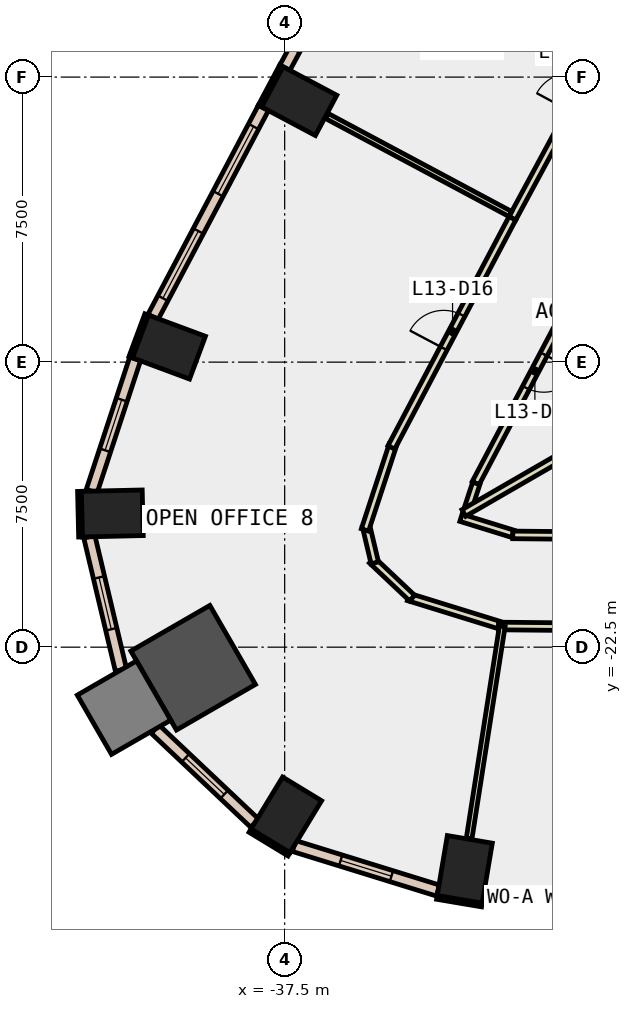
"""IFC4 building model, lengths in metres.
Left out: names, types, materials, properties, quantities, classifications, styles, units other than length and angle.
Written with IfcOpenShell. Run it as: python <this file> out.ifc"""

import sys

from ifc_helpers import new_model, si_unit, direction, frame, frame_2d, origin, origin_2d, place, context, subcontext, project, spatial, rectangle, extrude, element, fill, save


model = new_model("IFC4")
c1 = context("Model", 3, precision=1e-05, world=origin(), true_north=direction((0.0, 1.0)))
c2 = subcontext(c1, "Body", "Model", "MODEL_VIEW")
j1 = project(units=[si_unit("LENGTHUNIT", "METRE"), si_unit("PLANEANGLEUNIT", "RADIAN")], contexts=[c1])
p1 = place(None, origin())
s1 = spatial("IfcSite", under=j1, at=p1, CompositionType="ELEMENT")
p2 = place(p1, origin())
s2 = spatial("IfcBuilding", under=s1, at=p2, CompositionType="ELEMENT")
p3 = place(p2, frame((0.0, 0.0, 64.4)))
s3 = spatial("IfcBuildingStorey", under=s2, at=p3, CompositionType="ELEMENT", Elevation=64.4)
for number, where, z_axis, x_axis in (
    (1, (-32.761, -28.346, -0.4), (0.0, 0.0, 1.0), (-0.986, 0.167, 0.0)),
    (2, (-37.117, -8.132, -0.4), (0.0, 0.0, 1.0), (0.469, 0.883, 0.0)),
    (3, (-40.544, -14.604, -0.4), (0.0, 0.0, 1.0), (0.348, 0.937, 0.0)),
    (4, (-42.035, -18.982, -0.4), (0.0, 0.0, 1.0), (-0.023, 1.0, 0.0)),
):
    element("IfcColumn", number, at=place(p3, frame(where, z_axis=z_axis, x_axis=x_axis)), inside=s3, PredefinedType="COLUMN", context=c2, shape_type="SweptSolid", body=[
        extrude(rectangle(XDim=1.2, YDim=1.6, at=origin_2d()), origin(), (0.0, 0.0, 1.0), 4.2),
    ])
p4 = place(p3, frame((-39.908, -23.041, -0.4), z_axis=(0.0, 0.0, 1.0), x_axis=(0.866025403784, 0.5, 0.0)))
e5 = element("IfcColumn", 5, at=p4, inside=s3, PredefinedType="COLUMN", context=c2, shape_type="SweptSolid", body=[
    extrude(rectangle(XDim=2.4, YDim=2.4, at=origin_2d()), origin(), (0.0, 0.0, 1.0), 4.2),
])
p5 = place(p3, frame((-37.457, -26.913, -0.4), z_axis=(0.0, 0.0, 1.0), x_axis=(-0.854522294989, 0.519414716163, 0.0)))
e6 = element("IfcColumn", 6, at=p5, inside=s3, PredefinedType="COLUMN", context=c2, shape_type="SweptSolid", body=[
    extrude(rectangle(XDim=1.2, YDim=1.6, at=origin_2d()), origin(), (0.0, 0.0, 1.0), 4.2),
])
p6 = place(p3, frame((-41.727, -24.091, -0.4), z_axis=(0.0, 0.0, 1.0), x_axis=(0.866025403784, 0.5, 0.0)))
e7 = element("IfcColumn", 7, at=p6, inside=s3, PredefinedType="COLUMN", context=c2, shape_type="SweptSolid", body=[
    extrude(rectangle(XDim=1.8, YDim=1.8, at=origin_2d()), origin(), (0.0, 0.0, 1.0), 4.2),
])
p7 = place(p3, frame((-37.586, -7.204, 0.0), z_axis=(0.0, 0.0, 1.0), x_axis=(-0.469467784567, -0.882949601763, 0.0)))
e8 = element("IfcWall", 8, at=p7, inside=s3, PredefinedType="STANDARD", context=c2, shape_type="SweptSolid", body=[
    extrude(rectangle(XDim=1.199, YDim=0.1, at=frame_2d((0.6, 0.0))), origin(), (0.0, 0.0, 1.0), 3.8),
])
p8 = place(p3, frame((-41.132, -13.746, 0.0), z_axis=(0.0, 0.0, 1.0), x_axis=(-0.348268249601, -0.937394914814, 0.0)))
e9 = element("IfcWall", 9, at=p8, inside=s3, PredefinedType="STANDARD", context=c2, shape_type="SweptSolid", body=[
    extrude(rectangle(XDim=1.2, YDim=0.1, at=frame_2d((0.6, 0.0))), origin(), (0.0, 0.0, 1.0), 3.8),
])
p9 = place(p3, frame((-33.494, -29.084, 0.0), z_axis=(0.0, 0.0, 1.0), x_axis=(0.986011774526, -0.166675674579, 0.0)))
e10 = element("IfcWall", 10, at=p9, inside=s3, PredefinedType="STANDARD", context=c2, shape_type="SweptSolid", body=[
    extrude(rectangle(XDim=1.2, YDim=0.1, at=frame_2d((0.6, 0.0))), origin(), (0.0, 0.0, 1.0), 3.8),
])
p10 = place(p3, frame((-42.899, -18.401, 0.0), z_axis=(0.0, 0.0, 1.0), x_axis=(0.023183352363, -0.999731229968, 0.0)))
e11 = element("IfcWall", 11, at=p10, inside=s3, PredefinedType="STANDARD", context=c2, shape_type="SweptSolid", body=[
    extrude(rectangle(XDim=1.2, YDim=0.1, at=frame_2d((0.6, 0.0))), origin(), (0.0, 0.0, 1.0), 3.8),
])
p11 = place(p3, frame((-38.411, -27.328, 0.0), z_axis=(0.0, 0.0, 1.0), x_axis=(0.854716608594, -0.519094903649, 0.0)))
e12 = element("IfcWall", 12, at=p11, inside=s3, PredefinedType="STANDARD", context=c2, shape_type="SweptSolid", body=[
    extrude(rectangle(XDim=1.2, YDim=0.1, at=frame_2d((0.6, 0.0))), origin(), (0.0, 0.0, 1.0), 3.8),
])
p12 = place(p3, frame((-32.279, -29.089, 0.0), z_axis=(0.0, 0.0, 1.0), x_axis=(0.999952253205, -0.009771965572, 0.0)))
e13 = element("IfcWall", 13, at=p12, inside=s3, PredefinedType="STANDARD", context=c2, shape_type="SweptSolid", body=[
    extrude(rectangle(XDim=7.145, YDim=0.3, at=frame_2d((3.573, 0.0))), origin(), (0.0, 0.0, 1.0), 3.8),
])
p13 = place(p12, frame((0.586, 0.0, 0.9)))
e14 = element("IfcOpeningElement", 14, at=p13, cuts=e13, PredefinedType="OPENING", context=c2, shape_type="SweptSolid", body=[
    extrude(rectangle(XDim=2.4, YDim=2.6, at=frame_2d((1.2, 1.3))), frame((0.0, 0.16, 0.0), z_axis=(0.0, -1.0, 0.0), x_axis=(1.0, 0.0, 0.0)), (0.0, 0.0, 1.0), 0.32),
])
p14 = place(p12, frame((4.159, 0.0, 0.9)))
e15 = element("IfcOpeningElement", 15, at=p14, cuts=e13, PredefinedType="OPENING", context=c2, shape_type="SweptSolid", body=[
    extrude(rectangle(XDim=2.4, YDim=2.6, at=frame_2d((1.2, 1.3))), frame((0.0, 0.16, 0.0), z_axis=(0.0, -1.0, 0.0), x_axis=(1.0, 0.0, 0.0)), (0.0, 0.0, 1.0), 0.32),
])
p15 = place(p3, frame((-34.583, -1.864, 0.0), z_axis=(0.0, 0.0, 1.0), x_axis=(-0.475413659872, -0.879762383833, 0.0)))
e16 = element("IfcWall", 16, at=p15, inside=s3, PredefinedType="STANDARD", context=c2, shape_type="SweptSolid", body=[
    extrude(rectangle(XDim=6.125, YDim=0.3, at=frame_2d((3.063, 0.0))), origin(), (0.0, 0.0, 1.0), 3.8),
])
p16 = place(p15, frame((0.531, 0.0, 0.9)))
e17 = element("IfcOpeningElement", 17, at=p16, cuts=e16, PredefinedType="OPENING", context=c2, shape_type="SweptSolid", body=[
    extrude(rectangle(XDim=2.0, YDim=2.6, at=frame_2d((1.0, 1.3))), frame((0.0, 0.16, 0.0), z_axis=(0.0, -1.0, 0.0), x_axis=(1.0, 0.0, 0.0)), (0.0, 0.0, 1.0), 0.32),
])
p17 = place(p15, frame((3.594, 0.0, 0.9)))
e18 = element("IfcOpeningElement", 18, at=p17, cuts=e16, PredefinedType="OPENING", context=c2, shape_type="SweptSolid", body=[
    extrude(rectangle(XDim=2.0, YDim=2.6, at=frame_2d((1.0, 1.3))), frame((0.0, 0.16, 0.0), z_axis=(0.0, -1.0, 0.0), x_axis=(1.0, 0.0, 0.0)), (0.0, 0.0, 1.0), 0.32),
])
p18 = place(p3, frame((-38.059, -8.31, 0.0), z_axis=(0.0, 0.0, 1.0), x_axis=(-0.467041710902, -0.884235285587, 0.0)))
e19 = element("IfcWall", 19, at=p18, inside=s3, PredefinedType="STANDARD", context=c2, shape_type="SweptSolid", body=[
    extrude(rectangle(XDim=6.22, YDim=0.3, at=frame_2d((3.11, 0.0))), origin(), (0.0, 0.0, 1.0), 3.8),
])
p19 = place(p18, frame((0.555, 0.0, 0.9)))
e20 = element("IfcOpeningElement", 20, at=p19, cuts=e19, PredefinedType="OPENING", context=c2, shape_type="SweptSolid", body=[
    extrude(rectangle(XDim=2.0, YDim=2.6, at=frame_2d((1.0, 1.3))), frame((0.0, 0.16, 0.0), z_axis=(0.0, -1.0, 0.0), x_axis=(1.0, 0.0, 0.0)), (0.0, 0.0, 1.0), 0.32),
])
p20 = place(p18, frame((3.665, 0.0, 0.9)))
e21 = element("IfcOpeningElement", 21, at=p20, cuts=e19, PredefinedType="OPENING", context=c2, shape_type="SweptSolid", body=[
    extrude(rectangle(XDim=2.0, YDim=2.6, at=frame_2d((1.0, 1.3))), frame((0.0, 0.16, 0.0), z_axis=(0.0, -1.0, 0.0), x_axis=(1.0, 0.0, 0.0)), (0.0, 0.0, 1.0), 0.32),
])
p21 = place(p3, frame((-41.434, -14.913, 0.0), z_axis=(0.0, 0.0, 1.0), x_axis=(-0.31208801137, -0.95005319491, 0.0)))
e22 = element("IfcWall", 22, at=p21, inside=s3, PredefinedType="STANDARD", context=c2, shape_type="SweptSolid", body=[
    extrude(rectangle(XDim=3.665, YDim=0.3, at=frame_2d((1.833, 0.0))), origin(), (0.0, 0.0, 1.0), 3.8),
])
p22 = place(p21, frame((1.133, 0.0, 0.9)))
e23 = element("IfcOpeningElement", 23, at=p22, cuts=e22, PredefinedType="OPENING", context=c2, shape_type="SweptSolid", body=[
    extrude(rectangle(XDim=1.4, YDim=2.6, at=frame_2d((0.7, 1.3))), frame((0.0, 0.16, 0.0), z_axis=(0.0, -1.0, 0.0), x_axis=(1.0, 0.0, 0.0)), (0.0, 0.0, 1.0), 0.32),
])
p23 = place(p3, frame((-42.64, -19.595, 0.0), z_axis=(0.0, 0.0, 1.0), x_axis=(0.230893603767, -0.972979004778, 0.0)))
e24 = element("IfcWall", 24, at=p23, inside=s3, PredefinedType="STANDARD", context=c2, shape_type="SweptSolid", body=[
    extrude(rectangle(XDim=3.603, YDim=0.3, at=frame_2d((1.801, 0.0))), origin(), (0.0, 0.0, 1.0), 3.8),
])
p24 = place(p23, frame((1.101, 0.0, 0.9)))
e25 = element("IfcOpeningElement", 25, at=p24, cuts=e24, PredefinedType="OPENING", context=c2, shape_type="SweptSolid", body=[
    extrude(rectangle(XDim=1.4, YDim=2.6, at=frame_2d((0.7, 1.3))), frame((0.0, 0.16, 0.0), z_axis=(0.0, -1.0, 0.0), x_axis=(1.0, 0.0, 0.0)), (0.0, 0.0, 1.0), 0.32),
])
p25 = place(p3, frame((-40.909, -24.657, 0.0), z_axis=(0.0, 0.0, 1.0), x_axis=(0.727082698591, -0.686549888508, 0.0)))
e26 = element("IfcWall", 26, at=p25, inside=s3, PredefinedType="STANDARD", context=c2, shape_type="SweptSolid", body=[
    extrude(rectangle(XDim=3.602, YDim=0.3, at=frame_2d((1.801, 0.0))), origin(), (0.0, 0.0, 1.0), 3.8),
])
p26 = place(p25, frame((1.101, 0.0, 0.9)))
e27 = element("IfcOpeningElement", 27, at=p26, cuts=e26, PredefinedType="OPENING", context=c2, shape_type="SweptSolid", body=[
    extrude(rectangle(XDim=1.4, YDim=2.6, at=frame_2d((0.7, 1.3))), frame((0.0, 0.16, 0.0), z_axis=(0.0, -1.0, 0.0), x_axis=(1.0, 0.0, 0.0)), (0.0, 0.0, 1.0), 0.32),
])
p27 = place(p3, frame((-37.254, -27.732, 0.0), z_axis=(0.0, 0.0, 1.0), x_axis=(0.955308230541, -0.295611543518, 0.0)))
e28 = element("IfcWall", 28, at=p27, inside=s3, PredefinedType="STANDARD", context=c2, shape_type="SweptSolid", body=[
    extrude(rectangle(XDim=3.968, YDim=0.3, at=frame_2d((1.984, 0.0))), origin(), (0.0, 0.0, 1.0), 3.8),
])
p28 = place(p27, frame((1.284, 0.0, 0.9)))
e29 = element("IfcOpeningElement", 29, at=p28, cuts=e28, PredefinedType="OPENING", context=c2, shape_type="SweptSolid", body=[
    extrude(rectangle(XDim=1.4, YDim=2.6, at=frame_2d((0.7, 1.3))), frame((0.0, 0.16, 0.0), z_axis=(0.0, -1.0, 0.0), x_axis=(1.0, 0.0, 0.0)), (0.0, 0.0, 1.0), 0.32),
])
p29 = place(p3, frame((-29.356, -12.281, 0.0), z_axis=(0.0, 0.0, 1.0), x_axis=(-0.467123190417, -0.884192244353, 0.0)))
e30 = element("IfcWall", 30, at=p29, inside=s3, PredefinedType="PARTITIONING", context=c2, shape_type="SweptSolid", body=[
    extrude(rectangle(XDim=6.677, YDim=0.2, at=frame_2d((3.339, 0.0))), origin(), (0.0, 0.0, 1.0), 3.8),
])
p30 = place(p29, frame((2.839, 0.0, 0.0)))
e31 = element("IfcOpeningElement", 31, at=p30, cuts=e30, PredefinedType="OPENING", context=c2, shape_type="SweptSolid", body=[
    extrude(rectangle(XDim=1.0, YDim=2.1, at=frame_2d((0.5, 1.05))), frame((0.0, 0.11, 0.0), z_axis=(0.0, -1.0, 0.0), x_axis=(1.0, 0.0, 0.0)), (0.0, 0.0, 1.0), 0.22),
])
p31 = place(p3, frame((-32.459, -18.191, 0.0), z_axis=(0.0, 0.0, 1.0), x_axis=(-0.312158013001, -0.950030196846, 0.0)))
e32 = element("IfcWall", 32, at=p31, inside=s3, PredefinedType="PARTITIONING", context=c2, shape_type="SweptSolid", body=[
    extrude(rectangle(XDim=0.666, YDim=0.2, at=frame_2d((0.333, 0.0))), origin(), (0.0, 0.0, 1.0), 3.8),
])
p32 = place(p3, frame((-32.861, -19.095, 0.0), z_axis=(0.0, 0.0, 1.0), x_axis=(0.955301951006, -0.29563183591, 0.0)))
e33 = element("IfcWall", 33, at=p32, inside=s3, PredefinedType="PARTITIONING", context=c2, shape_type="SweptSolid", body=[
    extrude(rectangle(XDim=1.431, YDim=0.2, at=frame_2d((0.716, 0.0))), origin(), (0.0, 0.0, 1.0), 3.8),
])
p33 = place(p3, frame((-31.498, -19.546, 0.0), z_axis=(0.0, 0.0, 1.0), x_axis=(0.999950985372, -0.009900851195, 0.0)))
e34 = element("IfcWall", 34, at=p33, inside=s3, PredefinedType="PARTITIONING", context=c2, shape_type="SweptSolid", body=[
    extrude(rectangle(XDim=6.978, YDim=0.2, at=frame_2d((3.489, 0.0))), origin(), (0.0, 0.0, 1.0), 3.8),
])
p34 = place(p3, frame((-31.509, -11.216, 0.0), z_axis=(0.0, 0.0, 1.0), x_axis=(0.475367159168, 0.879787510701, 0.0)))
e35 = element("IfcWall", 35, at=p34, inside=s3, PredefinedType="PARTITIONING", context=c2, shape_type="SweptSolid", body=[
    extrude(rectangle(XDim=7.257, YDim=0.2, at=frame_2d((3.629, 0.0))), origin(), (0.0, 0.0, 1.0), 3.8),
])
p35 = place(p34, frame((3.203, 0.0, 0.0)))
e36 = element("IfcOpeningElement", 36, at=p35, cuts=e35, PredefinedType="OPENING", context=c2, shape_type="SweptSolid", body=[
    extrude(rectangle(XDim=1.0, YDim=2.1, at=frame_2d((0.5, 1.05))), frame((0.0, 0.11, 0.0), z_axis=(0.0, -1.0, 0.0), x_axis=(1.0, 0.0, 0.0)), (0.0, 0.0, 1.0), 0.22),
])
p36 = place(p3, frame((-31.868, -21.914, 0.0), z_axis=(0.0, 0.0, 1.0), x_axis=(-0.955329505989, 0.295542780299, 0.0)))
e37 = element("IfcWall", 37, at=p36, inside=s3, PredefinedType="PARTITIONING", context=c2, shape_type="SweptSolid", body=[
    extrude(rectangle(XDim=2.484, YDim=0.2, at=frame_2d((1.242, 0.0))), origin(), (0.0, 0.0, 1.0), 3.8),
])
p37 = place(p3, frame((-34.146, -21.209, 0.0), z_axis=(0.0, 0.0, 1.0), x_axis=(-0.727092478665, 0.686539530885, 0.0)))
e38 = element("IfcWall", 38, at=p37, inside=s3, PredefinedType="PARTITIONING", context=c2, shape_type="SweptSolid", body=[
    extrude(rectangle(XDim=1.451, YDim=0.2, at=frame_2d((0.726, 0.0))), origin(), (0.0, 0.0, 1.0), 3.8),
])
p38 = place(p3, frame((-35.129, -20.281, 0.0), z_axis=(0.0, 0.0, 1.0), x_axis=(-0.230392306785, 0.973097829087, 0.0)))
e39 = element("IfcWall", 39, at=p38, inside=s3, PredefinedType="PARTITIONING", context=c2, shape_type="SweptSolid", body=[
    extrude(rectangle(XDim=0.986, YDim=0.2, at=frame_2d((0.493, 0.0))), origin(), (0.0, 0.0, 1.0), 3.8),
])
p39 = place(p3, frame((-35.387, -19.416, 0.0), z_axis=(0.0, 0.0, 1.0), x_axis=(0.31172635658, 0.950171920556, 0.0)))
e40 = element("IfcWall", 40, at=p39, inside=s3, PredefinedType="PARTITIONING", context=c2, shape_type="SweptSolid", body=[
    extrude(rectangle(XDim=2.345, YDim=0.2, at=frame_2d((1.172, 0.0))), origin(), (0.0, 0.0, 1.0), 3.8),
])
p40 = place(p3, frame((-34.692, -17.243, 0.0), z_axis=(0.0, 0.0, 1.0), x_axis=(0.467102540817, 0.884203153332, 0.0)))
e41 = element("IfcWall", 41, at=p40, inside=s3, PredefinedType="PARTITIONING", context=c2, shape_type="SweptSolid", body=[
    extrude(rectangle(XDim=6.816, YDim=0.2, at=frame_2d((3.408, 0.0))), origin(), (0.0, 0.0, 1.0), 3.8),
])
p41 = place(p40, frame((2.946, 0.0, 0.0)))
e42 = element("IfcOpeningElement", 42, at=p41, cuts=e41, PredefinedType="OPENING", context=c2, shape_type="SweptSolid", body=[
    extrude(rectangle(XDim=1.0, YDim=2.1, at=frame_2d((0.5, 1.05))), frame((0.0, 0.11, 0.0), z_axis=(0.0, -1.0, 0.0), x_axis=(1.0, 0.0, 0.0)), (0.0, 0.0, 1.0), 0.22),
])
p42 = place(p3, frame((-24.525, -22.015, 0.0), z_axis=(0.0, 0.0, 1.0), x_axis=(-0.999952295614, 0.009767624922, 0.0)))
e43 = element("IfcWall", 43, at=p42, inside=s3, PredefinedType="PARTITIONING", context=c2, shape_type="SweptSolid", body=[
    extrude(rectangle(XDim=7.348, YDim=0.2, at=frame_2d((3.674, 0.0))), origin(), (0.0, 0.0, 1.0), 3.8),
])
p43 = place(p3, frame((-26.064, -15.088, 0.0), z_axis=(0.0, 0.0, 1.0), x_axis=(-0.865982841629, -0.500073712571, 0.0)))
e44 = element("IfcWall", 44, at=p43, inside=s3, PredefinedType="PARTITIONING", context=c2, shape_type="SweptSolid", body=[
    extrude(rectangle(XDim=7.761, YDim=0.2, at=frame_2d((3.88, 0.0))), origin(), (0.0, 0.0, 1.0), 3.8),
])
p44 = place(p3, frame((-31.561, -11.103, 0.0), z_axis=(0.0, 0.0, 1.0), x_axis=(-0.882056805494, 0.47114306944, 0.0)))
e45 = element("IfcWall", 45, at=p44, inside=s3, PredefinedType="PARTITIONING", context=c2, shape_type="SweptSolid", body=[
    extrude(rectangle(XDim=5.48, YDim=0.15, at=frame_2d((2.74, 0.0))), origin(), (0.0, 0.0, 1.0), 3.8),
])
p45 = place(p3, frame((-31.773, -21.944, 0.0), z_axis=(0.0, 0.0, 1.0), x_axis=(-0.154313693693, -0.988021904585, 0.0)))
e46 = element("IfcWall", 46, at=p45, inside=s3, PredefinedType="PARTITIONING", context=c2, shape_type="SweptSolid", body=[
    extrude(rectangle(XDim=5.658, YDim=0.15, at=frame_2d((2.829, 0.0))), origin(), (0.0, 0.0, 1.0), 3.8),
])
p46 = place(p13, origin())
e47 = element("IfcWindow", 47, at=p46, inside=s3, PartitioningType="SINGLE_PANEL", PredefinedType="WINDOW", context=c2, shape_type="SweptSolid", body=[
    extrude(rectangle(XDim=2.4, YDim=2.6, at=frame_2d((1.2, 1.3))), frame((0.0, 0.03, 0.0), z_axis=(0.0, -1.0, 0.0), x_axis=(1.0, 0.0, 0.0)), (0.0, 0.0, 1.0), 0.06),
])
fill(e14, e47)
p47 = place(p19, origin())
e48 = element("IfcWindow", 48, at=p47, inside=s3, PartitioningType="SINGLE_PANEL", PredefinedType="WINDOW", context=c2, shape_type="SweptSolid", body=[
    extrude(rectangle(XDim=2.0, YDim=2.6, at=frame_2d((1.0, 1.3))), frame((0.0, 0.03, 0.0), z_axis=(0.0, -1.0, 0.0), x_axis=(1.0, 0.0, 0.0)), (0.0, 0.0, 1.0), 0.06),
])
fill(e20, e48)
p48 = place(p20, origin())
e49 = element("IfcWindow", 49, at=p48, inside=s3, PartitioningType="SINGLE_PANEL", PredefinedType="WINDOW", context=c2, shape_type="SweptSolid", body=[
    extrude(rectangle(XDim=2.0, YDim=2.6, at=frame_2d((1.0, 1.3))), frame((0.0, 0.03, 0.0), z_axis=(0.0, -1.0, 0.0), x_axis=(1.0, 0.0, 0.0)), (0.0, 0.0, 1.0), 0.06),
])
fill(e21, e49)
p49 = place(p22, origin())
e50 = element("IfcWindow", 50, at=p49, inside=s3, PartitioningType="SINGLE_PANEL", PredefinedType="WINDOW", context=c2, shape_type="SweptSolid", body=[
    extrude(rectangle(XDim=1.4, YDim=2.6, at=frame_2d((0.7, 1.3))), frame((0.0, 0.03, 0.0), z_axis=(0.0, -1.0, 0.0), x_axis=(1.0, 0.0, 0.0)), (0.0, 0.0, 1.0), 0.06),
])
fill(e23, e50)
p50 = place(p24, origin())
e51 = element("IfcWindow", 51, at=p50, inside=s3, PartitioningType="SINGLE_PANEL", PredefinedType="WINDOW", context=c2, shape_type="SweptSolid", body=[
    extrude(rectangle(XDim=1.4, YDim=2.6, at=frame_2d((0.7, 1.3))), frame((0.0, 0.03, 0.0), z_axis=(0.0, -1.0, 0.0), x_axis=(1.0, 0.0, 0.0)), (0.0, 0.0, 1.0), 0.06),
])
fill(e25, e51)
p51 = place(p26, origin())
e52 = element("IfcWindow", 52, at=p51, inside=s3, PartitioningType="SINGLE_PANEL", PredefinedType="WINDOW", context=c2, shape_type="SweptSolid", body=[
    extrude(rectangle(XDim=1.4, YDim=2.6, at=frame_2d((0.7, 1.3))), frame((0.0, 0.03, 0.0), z_axis=(0.0, -1.0, 0.0), x_axis=(1.0, 0.0, 0.0)), (0.0, 0.0, 1.0), 0.06),
])
fill(e27, e52)
p52 = place(p28, origin())
e53 = element("IfcWindow", 53, at=p52, inside=s3, PartitioningType="SINGLE_PANEL", PredefinedType="WINDOW", context=c2, shape_type="SweptSolid", body=[
    extrude(rectangle(XDim=1.4, YDim=2.6, at=frame_2d((0.7, 1.3))), frame((0.0, 0.03, 0.0), z_axis=(0.0, -1.0, 0.0), x_axis=(1.0, 0.0, 0.0)), (0.0, 0.0, 1.0), 0.06),
])
fill(e29, e53)
p53 = place(p41, origin())
e54 = element("IfcDoor", 54, at=p53, inside=s3, OperationType="SINGLE_SWING_LEFT", PredefinedType="DOOR", context=c2, shape_type="SweptSolid", body=[
    extrude(rectangle(XDim=1.0, YDim=2.1, at=frame_2d((0.5, 1.05))), frame((0.0, 0.025, 0.0), z_axis=(0.0, -1.0, 0.0), x_axis=(1.0, 0.0, 0.0)), (0.0, 0.0, 1.0), 0.05),
])
fill(e42, e54)
p54 = place(p30, origin())
e55 = element("IfcDoor", 55, at=p54, inside=s3, OperationType="SINGLE_SWING_LEFT", PredefinedType="DOOR", context=c2, shape_type="SweptSolid", body=[
    extrude(rectangle(XDim=1.0, YDim=2.1, at=frame_2d((0.5, 1.05))), frame((0.0, 0.025, 0.0), z_axis=(0.0, -1.0, 0.0), x_axis=(1.0, 0.0, 0.0)), (0.0, 0.0, 1.0), 0.05),
])
fill(e31, e55)
save(model, sys.argv[1])
